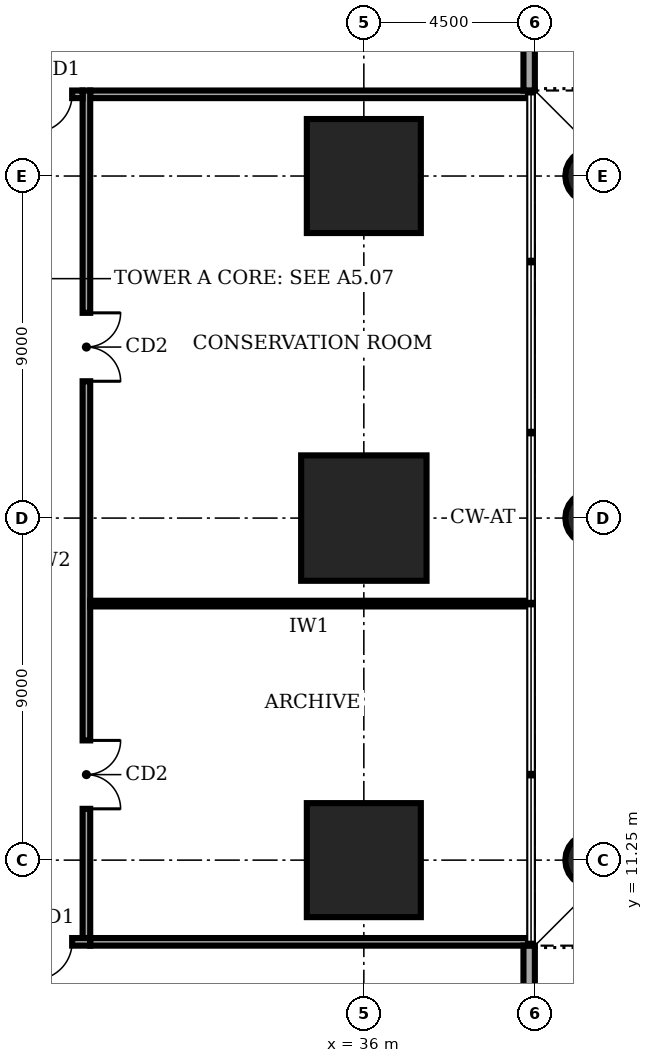
"""IFC4 building model, lengths in metres.
Left out: names, types, materials, properties, quantities, classifications, styles, units other than length and angle.
Written with IfcOpenShell. Run it as: python <this file> out.ifc"""

import sys

from ifc_helpers import new_model, si_unit, direction, frame, frame_2d, origin, origin_2d, place, context, subcontext, project, spatial, rectangle, circle, extrude, element, fill, save


model = new_model("IFC4")
c1 = context("Model", 3, precision=1e-05, world=origin(), true_north=direction((0.0, 1.0)))
c2 = subcontext(c1, "Body", "Model", "MODEL_VIEW")
j1 = project(units=[si_unit("LENGTHUNIT", "METRE"), si_unit("PLANEANGLEUNIT", "RADIAN")], contexts=[c1])
p1 = place(None, origin())
s1 = spatial("IfcSite", under=j1, at=p1, CompositionType="ELEMENT")
p2 = place(p1, origin())
s2 = spatial("IfcBuilding", under=s1, at=p2, CompositionType="ELEMENT")
p3 = place(p2, frame((0.0, 0.0, 16.0)))
s3 = spatial("IfcBuildingStorey", under=s2, at=p3, CompositionType="ELEMENT", Elevation=16.0)
p4 = place(p3, frame((36.0, 11.25, 0.0), z_axis=(0.0, 0.0, 1.0), x_axis=(1.0, 0.0, 0.0)))
e1 = element("IfcColumn", 1, at=p4, inside=s3, PredefinedType="COLUMN", context=c2, shape_type="SweptSolid", body=[
    extrude(rectangle(XDim=3.0, YDim=3.0, at=origin_2d()), origin(), (0.0, 0.0, 1.0), 5.0),
])
p5 = place(p3, frame((36.0, 20.25, 0.0), z_axis=(0.0, 0.0, 1.0), x_axis=(1.0, 0.0, 0.0)))
e2 = element("IfcColumn", 2, at=p5, inside=s3, PredefinedType="COLUMN", context=c2, shape_type="SweptSolid", body=[
    extrude(rectangle(XDim=3.3, YDim=3.3, at=origin_2d()), origin(), (0.0, 0.0, 1.0), 5.0),
])
p6 = place(p3, frame((36.0, 29.25, 0.0), z_axis=(0.0, 0.0, 1.0), x_axis=(1.0, 0.0, 0.0)))
e3 = element("IfcColumn", 3, at=p6, inside=s3, PredefinedType="COLUMN", context=c2, shape_type="SweptSolid", body=[
    extrude(rectangle(XDim=3.0, YDim=3.0, at=origin_2d()), origin(), (0.0, 0.0, 1.0), 5.0),
])
for number, where, z_axis, x_axis in (
    (4, (42.0, 11.25, 0.0), (0.0, 0.0, 1.0), (1.0, 0.0, 0.0)),
    (5, (42.0, 20.25, 0.0), (0.0, 0.0, 1.0), (1.0, 0.0, 0.0)),
    (6, (42.0, 29.25, 0.0), (0.0, 0.0, 1.0), (1.0, 0.0, 0.0)),
):
    element("IfcColumn", number, at=place(p3, frame(where, z_axis=z_axis, x_axis=x_axis)), inside=s3, PredefinedType="COLUMN", context=c2, shape_type="SweptSolid", body=[
        extrude(circle(Radius=0.7, at=origin_2d()), origin(), (0.0, 0.0, 1.0), 5.0),
    ])
p7 = place(p3, frame((11.9, 9.1, 0.0), z_axis=(0.0, 0.0, 1.0), x_axis=(1.0, 0.0, 0.0)))
e7 = element("IfcWall", 7, at=p7, inside=s3, PredefinedType="SOLIDWALL", context=c2, shape_type="SweptSolid", body=[
    extrude(rectangle(XDim=16.9, YDim=0.2, at=frame_2d((8.45, 0.0))), origin(), (0.0, 0.0, 1.0), 4.7),
])
p8 = place(p7, frame((0.275, 0.0, 0.0)))
e8 = element("IfcOpeningElement", 8, at=p8, cuts=e7, PredefinedType="OPENING", context=c2, shape_type="SweptSolid", body=[
    extrude(rectangle(XDim=1.0, YDim=2.1, at=frame_2d((0.5, 1.05))), frame((0.0, 0.11, 0.0), z_axis=(0.0, -1.0, 0.0), x_axis=(1.0, 0.0, 0.0)), (0.0, 0.0, 1.0), 0.22),
])
p9 = place(p7, frame((3.35, 0.0, 0.0)))
e9 = element("IfcOpeningElement", 9, at=p9, cuts=e7, PredefinedType="OPENING", context=c2, shape_type="SweptSolid", body=[
    extrude(rectangle(XDim=1.0, YDim=2.1, at=frame_2d((0.5, 1.05))), frame((0.0, 0.11, 0.0), z_axis=(0.0, -1.0, 0.0), x_axis=(1.0, 0.0, 0.0)), (0.0, 0.0, 1.0), 0.22),
])
p10 = place(p7, frame((9.7, 0.0, 0.0)))
e10 = element("IfcOpeningElement", 10, at=p10, cuts=e7, PredefinedType="OPENING", context=c2, shape_type="SweptSolid", body=[
    extrude(rectangle(XDim=1.8, YDim=2.1, at=frame_2d((0.9, 1.05))), frame((0.0, 0.11, 0.0), z_axis=(0.0, -1.0, 0.0), x_axis=(1.0, 0.0, 0.0)), (0.0, 0.0, 1.0), 0.22),
])
p11 = place(p7, frame((15.425, 0.0, 0.0)))
e11 = element("IfcOpeningElement", 11, at=p11, cuts=e7, PredefinedType="OPENING", context=c2, shape_type="SweptSolid", body=[
    extrude(rectangle(XDim=1.0, YDim=2.1, at=frame_2d((0.5, 1.05))), frame((0.0, 0.11, 0.0), z_axis=(0.0, -1.0, 0.0), x_axis=(1.0, 0.0, 0.0)), (0.0, 0.0, 1.0), 0.22),
])
p12 = place(p3, frame((28.7, 9.2, 0.0), z_axis=(0.0, 0.0, 1.0), x_axis=(0.0, 1.0, 0.0)))
e12 = element("IfcWall", 12, at=p12, inside=s3, PredefinedType="SOLIDWALL", context=c2, shape_type="SweptSolid", body=[
    extrude(rectangle(XDim=22.3, YDim=0.2, at=frame_2d((11.15, 0.0))), origin(), (0.0, 0.0, 1.0), 4.7),
])
p13 = place(p12, frame((3.4, 0.0, 0.0)))
e13 = element("IfcOpeningElement", 13, at=p13, cuts=e12, PredefinedType="OPENING", context=c2, shape_type="SweptSolid", body=[
    extrude(rectangle(XDim=1.8, YDim=2.1, at=frame_2d((0.9, 1.05))), frame((0.0, 0.11, 0.0), z_axis=(0.0, -1.0, 0.0), x_axis=(1.0, 0.0, 0.0)), (0.0, 0.0, 1.0), 0.22),
])
p14 = place(p12, frame((14.65, 0.0, 0.0)))
e14 = element("IfcOpeningElement", 14, at=p14, cuts=e12, PredefinedType="OPENING", context=c2, shape_type="SweptSolid", body=[
    extrude(rectangle(XDim=1.8, YDim=2.1, at=frame_2d((0.9, 1.05))), frame((0.0, 0.11, 0.0), z_axis=(0.0, -1.0, 0.0), x_axis=(1.0, 0.0, 0.0)), (0.0, 0.0, 1.0), 0.22),
])
p15 = place(p3, frame((28.6, 31.4, 0.0), z_axis=(0.0, 0.0, 1.0), x_axis=(-1.0, 0.0, 0.0)))
e15 = element("IfcWall", 15, at=p15, inside=s3, PredefinedType="SOLIDWALL", context=c2, shape_type="SweptSolid", body=[
    extrude(rectangle(XDim=16.9, YDim=0.2, at=frame_2d((8.45, 0.0))), origin(), (0.0, 0.0, 1.0), 4.7),
])
p16 = place(p15, frame((15.425, 0.0, 0.0)))
e16 = element("IfcOpeningElement", 16, at=p16, cuts=e15, PredefinedType="OPENING", context=c2, shape_type="SweptSolid", body=[
    extrude(rectangle(XDim=1.0, YDim=2.1, at=frame_2d((0.5, 1.05))), frame((0.0, 0.11, 0.0), z_axis=(0.0, -1.0, 0.0), x_axis=(1.0, 0.0, 0.0)), (0.0, 0.0, 1.0), 0.22),
])
p17 = place(p15, frame((9.7, 0.0, 0.0)))
e17 = element("IfcOpeningElement", 17, at=p17, cuts=e15, PredefinedType="OPENING", context=c2, shape_type="SweptSolid", body=[
    extrude(rectangle(XDim=1.8, YDim=2.1, at=frame_2d((0.9, 1.05))), frame((0.0, 0.11, 0.0), z_axis=(0.0, -1.0, 0.0), x_axis=(1.0, 0.0, 0.0)), (0.0, 0.0, 1.0), 0.22),
])
p18 = place(p15, frame((0.275, 0.0, 0.0)))
e18 = element("IfcOpeningElement", 18, at=p18, cuts=e15, PredefinedType="OPENING", context=c2, shape_type="SweptSolid", body=[
    extrude(rectangle(XDim=1.0, YDim=2.1, at=frame_2d((0.5, 1.05))), frame((0.0, 0.11, 0.0), z_axis=(0.0, -1.0, 0.0), x_axis=(1.0, 0.0, 0.0)), (0.0, 0.0, 1.0), 0.22),
])
p19 = place(p15, frame((3.35, 0.0, 0.0)))
e19 = element("IfcOpeningElement", 19, at=p19, cuts=e15, PredefinedType="OPENING", context=c2, shape_type="SweptSolid", body=[
    extrude(rectangle(XDim=1.0, YDim=2.1, at=frame_2d((0.5, 1.05))), frame((0.0, 0.11, 0.0), z_axis=(0.0, -1.0, 0.0), x_axis=(1.0, 0.0, 0.0)), (0.0, 0.0, 1.0), 0.22),
])
for number, where, z_axis, x_axis in (
    (20, (28.8, 9.1, 0.0), (0.0, 0.0, 1.0), (1.0, 0.0, 0.0)),
    (21, (28.8, 31.4, 0.0), (0.0, 0.0, 1.0), (1.0, 0.0, 0.0)),
):
    element("IfcWall", number, at=place(p3, frame(where, z_axis=z_axis, x_axis=x_axis)), inside=s3, PredefinedType="SOLIDWALL", context=c2, shape_type="SweptSolid", body=[
        extrude(rectangle(XDim=11.52, YDim=0.2, at=frame_2d((5.76, 0.0))), origin(), (0.0, 0.0, 1.0), 4.7),
    ])
p20 = place(p3, frame((28.8, 18.0, 0.0), z_axis=(0.0, 0.0, 1.0), x_axis=(1.0, 0.0, 0.0)))
e22 = element("IfcWall", 22, at=p20, inside=s3, PredefinedType="PARTITIONING", context=c2, shape_type="SweptSolid", body=[
    extrude(rectangle(XDim=11.52, YDim=0.15, at=frame_2d((5.76, 0.0))), origin(), (0.0, 0.0, 1.0), 4.7),
])
p21 = place(p3, frame((40.35, 4.97, 0.0), z_axis=(0.0, 0.0, 1.0), x_axis=(0.0, 1.0, 0.0)))
e23 = element("IfcWall", 23, at=p21, inside=s3, PredefinedType="SOLIDWALL", context=c2, shape_type="SweptSolid", body=[
    extrude(rectangle(XDim=4.03, YDim=0.3, at=frame_2d((2.015, 0.0))), origin(), (0.0, 0.0, 1.0), 4.7),
])
p22 = place(p3, frame((40.35, 31.5, 0.0), z_axis=(0.0, 0.0, 1.0), x_axis=(0.0, 1.0, 0.0)))
e24 = element("IfcWall", 24, at=p22, inside=s3, PredefinedType="SOLIDWALL", context=c2, shape_type="SweptSolid", body=[
    extrude(rectangle(XDim=16.63, YDim=0.3, at=frame_2d((8.315, 0.0))), origin(), (0.0, 0.0, 1.0), 4.7),
])
p23 = place(p22, frame((12.1, 0.0, 0.0)))
e25 = element("IfcOpeningElement", 25, at=p23, cuts=e24, PredefinedType="OPENING", context=c2, shape_type="SweptSolid", body=[
    extrude(rectangle(XDim=1.8, YDim=2.1, at=frame_2d((0.9, 1.05))), frame((0.0, 0.16, 0.0), z_axis=(0.0, -1.0, 0.0), x_axis=(1.0, 0.0, 0.0)), (0.0, 0.0, 1.0), 0.32),
])
p24 = place(p11, frame((1.0, 0.0, 0.0), z_axis=(0.0, 0.0, 1.0), x_axis=(-1.0, 0.0, 0.0)))
e26 = element("IfcDoor", 26, at=p24, inside=s3, OperationType="SINGLE_SWING_RIGHT", PredefinedType="DOOR", context=c2, shape_type="SweptSolid", body=[
    extrude(rectangle(XDim=1.0, YDim=2.1, at=frame_2d((0.5, 1.05))), frame((0.0, 0.025, 0.0), z_axis=(0.0, -1.0, 0.0), x_axis=(1.0, 0.0, 0.0)), (0.0, 0.0, 1.0), 0.05),
])
fill(e11, e26)
p25 = place(p13, frame((1.8, 0.0, 0.0), z_axis=(0.0, 0.0, 1.0), x_axis=(-1.0, 0.0, 0.0)))
e27 = element("IfcDoor", 27, at=p25, inside=s3, OperationType="DOUBLE_DOOR_SINGLE_SWING", PredefinedType="DOOR", context=c2, shape_type="SweptSolid", body=[
    extrude(rectangle(XDim=1.8, YDim=2.1, at=frame_2d((0.9, 1.05))), frame((0.0, 0.025, 0.0), z_axis=(0.0, -1.0, 0.0), x_axis=(1.0, 0.0, 0.0)), (0.0, 0.0, 1.0), 0.05),
])
fill(e13, e27)
p26 = place(p14, frame((1.8, 0.0, 0.0), z_axis=(0.0, 0.0, 1.0), x_axis=(-1.0, 0.0, 0.0)))
e28 = element("IfcDoor", 28, at=p26, inside=s3, OperationType="DOUBLE_DOOR_SINGLE_SWING", PredefinedType="DOOR", context=c2, shape_type="SweptSolid", body=[
    extrude(rectangle(XDim=1.8, YDim=2.1, at=frame_2d((0.9, 1.05))), frame((0.0, 0.025, 0.0), z_axis=(0.0, -1.0, 0.0), x_axis=(1.0, 0.0, 0.0)), (0.0, 0.0, 1.0), 0.05),
])
fill(e14, e28)
p27 = place(p18, origin())
e29 = element("IfcDoor", 29, at=p27, inside=s3, OperationType="SINGLE_SWING_RIGHT", PredefinedType="DOOR", context=c2, shape_type="SweptSolid", body=[
    extrude(rectangle(XDim=1.0, YDim=2.1, at=frame_2d((0.5, 1.05))), frame((0.0, 0.025, 0.0), z_axis=(0.0, -1.0, 0.0), x_axis=(1.0, 0.0, 0.0)), (0.0, 0.0, 1.0), 0.05),
])
fill(e18, e29)
save(model, sys.argv[1])
